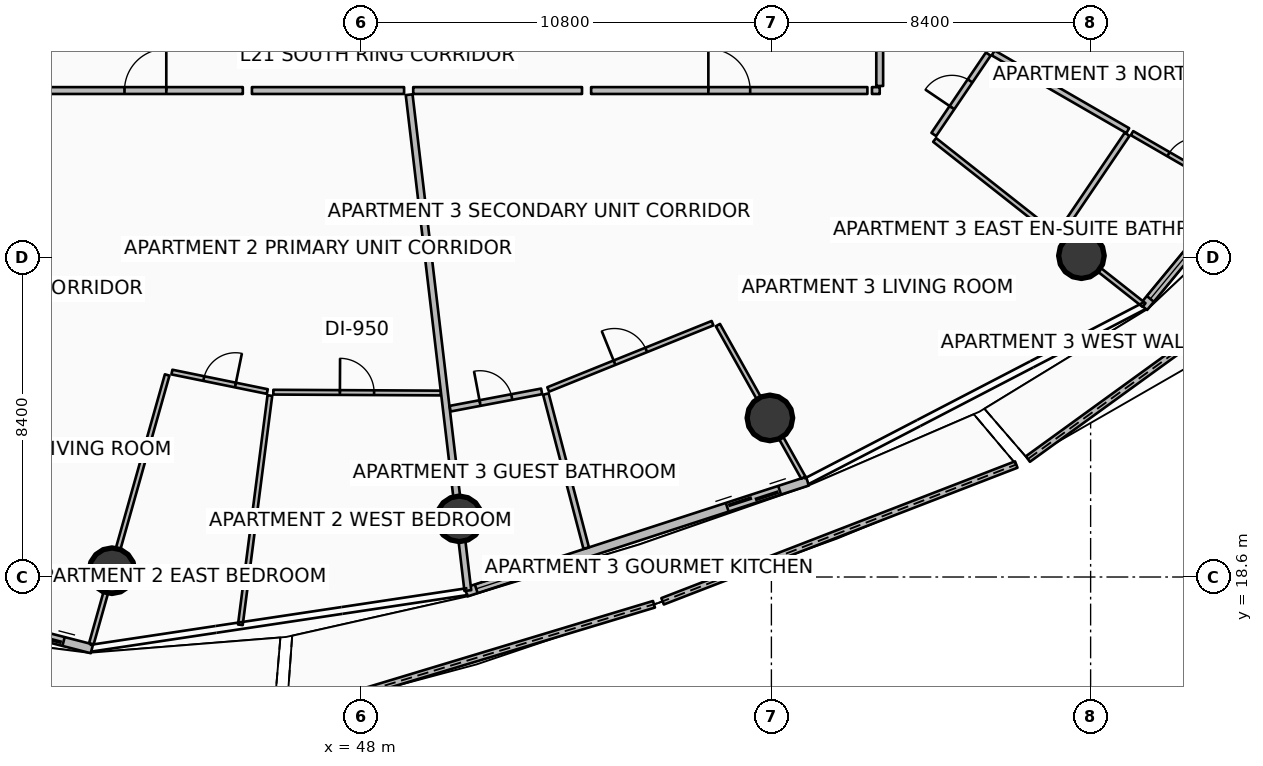
"""IFC4 building model, lengths in metres.
Left out: names, types, materials, properties, quantities, classifications, styles, units other than length and angle.
Written with IfcOpenShell. Run it as: python <this file> out.ifc"""

import sys

from ifc_helpers import new_model, si_unit, direction, frame, frame_2d, origin, origin_2d, place, context, subcontext, project, spatial, polyline, rectangle, circle, outline, extrude, element, fill, save


model = new_model("IFC4")
c1 = context("Model", 3, precision=1e-05, world=origin(), true_north=direction((0.0, 1.0)))
c2 = subcontext(c1, "Body", "Model", "MODEL_VIEW")
j1 = project(units=[si_unit("LENGTHUNIT", "METRE"), si_unit("PLANEANGLEUNIT", "RADIAN")], contexts=[c1])
p1 = place(None, origin())
s1 = spatial("IfcSite", under=j1, at=p1, CompositionType="ELEMENT")
p2 = place(p1, origin())
s2 = spatial("IfcBuilding", under=s1, at=p2, CompositionType="ELEMENT")
p3 = place(p2, frame((0.0, 0.0, 86.4)))
s3 = spatial("IfcBuildingStorey", under=s2, at=p3, CompositionType="ELEMENT", Elevation=86.4)
for number, where, z_axis, x_axis in (
    (1, (41.447, 18.766, 0.0), (0.0, 0.0, 1.0), (1.0, 0.0, 0.0)),
    (2, (50.588, 20.131, 0.0), (0.0, 0.0, 1.0), (1.0, 0.0, 0.0)),
    (3, (58.76, 22.786, 0.0), (0.0, 0.0, 1.0), (1.0, 0.0, 0.0)),
    (4, (66.958, 27.055, 0.0), (0.0, 0.0, 1.0), (1.0, 0.0, 0.0)),
):
    element("IfcColumn", number, at=place(p3, frame(where, z_axis=z_axis, x_axis=x_axis)), inside=s3, PredefinedType="COLUMN", context=c2, shape_type="SweptSolid", body=[
        extrude(circle(Radius=0.6, at=origin_2d()), origin(), (0.0, 0.0, 1.0), 3.5),
    ])
p4 = place(p3, frame((46.038, 14.964, 0.0), z_axis=(0.0, 0.0, 1.0), x_axis=(0.957356090971, 0.288910565886, 0.0)))
e5 = element("IfcWall", 5, at=p4, inside=s3, PredefinedType="PARAPET", context=c2, shape_type="SweptSolid", body=[
    extrude(outline(polyline([(0.0, 0.0), (10.103, 0.0), (10.103, 1.148), (5.051, 1.284), (0.0, 1.483), (0.0, 0.0)])), frame((0.0, 0.09, 0.0), z_axis=(0.0, -1.0, 0.0), x_axis=(1.0, 0.0, 0.0)), (0.0, 0.0, 1.0), 0.18),
])
p5 = place(p3, frame((55.937, 17.961, 0.0), z_axis=(0.0, 0.0, 1.0), x_axis=(0.93269770772, 0.360659099446, 0.0)))
e6 = element("IfcWall", 6, at=p5, inside=s3, PredefinedType="PARAPET", context=c2, shape_type="SweptSolid", body=[
    extrude(outline(polyline([(0.0, 0.0), (9.978, 0.0), (9.978, 1.224), (4.989, 1.127), (0.0, 1.148), (0.0, 0.0)])), frame((0.0, 0.09, 0.0), z_axis=(0.0, -1.0, 0.0), x_axis=(1.0, 0.0, 0.0)), (0.0, 0.0, 1.0), 0.18),
])
p6 = place(p3, frame((65.55, 21.704, 0.0), z_axis=(0.0, 0.0, 1.0), x_axis=(0.809764200103, 0.58675543477, 0.0)))
e7 = element("IfcWall", 7, at=p6, inside=s3, PredefinedType="PARAPET", context=c2, shape_type="SweptSolid", body=[
    extrude(outline(polyline([(0.0, 0.0), (11.241, 0.0), (11.241, 1.632), (5.621, 1.418), (0.0, 1.233), (0.0, 0.0)])), frame((0.0, 0.09, 0.0), z_axis=(0.0, -1.0, 0.0), x_axis=(1.0, 0.0, 0.0)), (0.0, 0.0, 1.0), 0.18),
])
p7 = place(p3, frame((30.186, 19.477, 0.0), z_axis=(0.0, 0.0, 1.0), x_axis=(0.968356180858, -0.249572248045, 0.0)))
e8 = element("IfcWall", 8, at=p7, inside=s3, PredefinedType="SOLIDWALL", context=c2, shape_type="SweptSolid", body=[
    extrude(rectangle(XDim=11.084, YDim=0.24, at=frame_2d((5.542, 0.0))), origin(), (0.0, 0.0, 1.0), 2.45),
])
p8 = place(p7, frame((8.865, 0.0, 0.0)))
e9 = element("IfcOpeningElement", 9, at=p8, cuts=e8, PredefinedType="OPENING", context=c2, shape_type="SweptSolid", body=[
    extrude(rectangle(XDim=1.45, YDim=2.15, at=frame_2d((0.725, 1.075))), frame((0.0, 0.13, 0.0), z_axis=(0.0, -1.0, 0.0), x_axis=(1.0, 0.0, 0.0)), (0.0, 0.0, 1.0), 0.26),
])
p9 = place(p7, frame((0.28, 0.0, 0.65)))
e10 = element("IfcOpeningElement", 10, at=p9, cuts=e8, PredefinedType="OPENING", context=c2, shape_type="SweptSolid", body=[
    extrude(rectangle(XDim=1.6, YDim=1.5, at=frame_2d((0.8, 0.75))), frame((0.0, 0.13, 0.0), z_axis=(0.0, -1.0, 0.0), x_axis=(1.0, 0.0, 0.0)), (0.0, 0.0, 1.0), 0.26),
])
p10 = place(p3, frame((50.767, 18.203, 0.0), z_axis=(0.0, 0.0, 1.0), x_axis=(0.951052494852, 0.30902937083, 0.0)))
e11 = element("IfcWall", 11, at=p10, inside=s3, PredefinedType="SOLIDWALL", context=c2, shape_type="SweptSolid", body=[
    extrude(rectangle(XDim=9.444, YDim=0.24, at=frame_2d((4.722, 0.0))), origin(), (0.0, 0.0, 1.0), 2.45),
])
p11 = place(p10, frame((7.224, 0.0, 0.0)))
e12 = element("IfcOpeningElement", 12, at=p11, cuts=e11, PredefinedType="OPENING", context=c2, shape_type="SweptSolid", body=[
    extrude(rectangle(XDim=1.45, YDim=2.15, at=frame_2d((0.725, 1.075))), frame((0.0, 0.13, 0.0), z_axis=(0.0, -1.0, 0.0), x_axis=(1.0, 0.0, 0.0)), (0.0, 0.0, 1.0), 0.26),
])
p12 = place(p10, frame((0.28, 0.0, 0.65)))
e13 = element("IfcOpeningElement", 13, at=p12, cuts=e11, PredefinedType="OPENING", context=c2, shape_type="SweptSolid", body=[
    extrude(rectangle(XDim=1.6, YDim=1.5, at=frame_2d((0.8, 0.75))), frame((0.0, 0.13, 0.0), z_axis=(0.0, -1.0, 0.0), x_axis=(1.0, 0.0, 0.0)), (0.0, 0.0, 1.0), 0.26),
])
p13 = place(p3, frame((68.593, 25.702, 0.0), z_axis=(0.0, 0.0, 1.0), x_axis=(0.636704975, 0.771107498868, 0.0)))
e14 = element("IfcWall", 14, at=p13, inside=s3, PredefinedType="SOLIDWALL", context=c2, shape_type="SweptSolid", body=[
    extrude(rectangle(XDim=11.084, YDim=0.24, at=frame_2d((5.542, 0.0))), origin(), (0.0, 0.0, 1.0), 2.45),
])
p14 = place(p13, frame((8.864, 0.0, 0.0)))
e15 = element("IfcOpeningElement", 15, at=p14, cuts=e14, PredefinedType="OPENING", context=c2, shape_type="SweptSolid", body=[
    extrude(rectangle(XDim=1.45, YDim=2.15, at=frame_2d((0.725, 1.075))), frame((0.0, 0.13, 0.0), z_axis=(0.0, -1.0, 0.0), x_axis=(1.0, 0.0, 0.0)), (0.0, 0.0, 1.0), 0.26),
])
p15 = place(p13, frame((0.28, 0.0, 0.65)))
e16 = element("IfcOpeningElement", 16, at=p15, cuts=e14, PredefinedType="OPENING", context=c2, shape_type="SweptSolid", body=[
    extrude(rectangle(XDim=1.6, YDim=1.5, at=frame_2d((0.8, 0.75))), frame((0.0, 0.13, 0.0), z_axis=(0.0, -1.0, 0.0), x_axis=(1.0, 0.0, 0.0)), (0.0, 0.0, 1.0), 0.26),
])
p16 = place(p3, frame((49.268, 31.291, 0.0), z_axis=(0.0, 0.0, 1.0), x_axis=(0.117532311618, -0.993069058891, 0.0)))
e17 = element("IfcWall", 17, at=p16, inside=s3, PredefinedType="PARTITIONING", context=c2, shape_type="SweptSolid", body=[
    extrude(rectangle(XDim=13.138, YDim=0.18, at=frame_2d((6.569, 0.0))), origin(), (0.0, 0.0, 1.0), 2.94),
])
p17 = place(p3, frame((39.764, 31.4, 0.0), z_axis=(0.0, 0.0, 1.0), x_axis=(1.0, 0.0, 0.0)))
e18 = element("IfcWall", 18, at=p17, inside=s3, PredefinedType="PARTITIONING", context=c2, shape_type="SweptSolid", body=[
    extrude(rectangle(XDim=5.127, YDim=0.18, at=frame_2d((2.563, 0.0))), origin(), (0.0, 0.0, 1.0), 2.94),
])
p18 = place(p17, frame((2.013, 0.0, 0.0)))
e19 = element("IfcOpeningElement", 19, at=p18, cuts=e18, PredefinedType="OPENING", context=c2, shape_type="SweptSolid", body=[
    extrude(rectangle(XDim=1.1, YDim=2.1, at=frame_2d((0.55, 1.05))), frame((0.0, 0.1, 0.0), z_axis=(0.0, -1.0, 0.0), x_axis=(1.0, 0.0, 0.0)), (0.0, 0.0, 1.0), 0.2),
])
p19 = place(p3, frame((45.131, 31.4, 0.0), z_axis=(0.0, 0.0, 1.0), x_axis=(1.0, 0.0, 0.0)))
e20 = element("IfcWall", 20, at=p19, inside=s3, PredefinedType="PARTITIONING", context=c2, shape_type="SweptSolid", body=[
    extrude(rectangle(XDim=4.004, YDim=0.18, at=frame_2d((2.002, 0.0))), origin(), (0.0, 0.0, 1.0), 2.94),
])
p20 = place(p3, frame((42.9, 23.917, 0.0), z_axis=(0.0, 0.0, 1.0), x_axis=(-0.27145069635, -0.962452346587, 0.0)))
e21 = element("IfcWall", 21, at=p20, inside=s3, PredefinedType="PARTITIONING", context=c2, shape_type="SweptSolid", body=[
    extrude(rectangle(XDim=7.349, YDim=0.125, at=frame_2d((3.674, 0.0))), origin(), (0.0, 0.0, 1.0), 2.94),
])
p21 = place(p3, frame((45.603, 23.375, 0.0), z_axis=(0.0, 0.0, 1.0), x_axis=(-0.127689849516, -0.991814147071, 0.0)))
e22 = element("IfcWall", 22, at=p21, inside=s3, PredefinedType="PARTITIONING", context=c2, shape_type="SweptSolid", body=[
    extrude(rectangle(XDim=6.082, YDim=0.125, at=frame_2d((3.041, 0.0))), origin(), (0.0, 0.0, 1.0), 2.94),
])
p22 = place(p3, frame((43.025, 23.993, 0.0), z_axis=(0.0, 0.0, 1.0), x_axis=(0.97978119615, -0.200072006215, 0.0)))
e23 = element("IfcWall", 23, at=p22, inside=s3, PredefinedType="PARTITIONING", context=c2, shape_type="SweptSolid", body=[
    extrude(rectangle(XDim=2.562, YDim=0.125, at=frame_2d((1.281, 0.0))), origin(), (0.0, 0.0, 1.0), 2.94),
])
p23 = place(p22, frame((0.856, 0.0, 0.0)))
e24 = element("IfcOpeningElement", 24, at=p23, cuts=e23, PredefinedType="OPENING", context=c2, shape_type="SweptSolid", body=[
    extrude(rectangle(XDim=0.85, YDim=2.06, at=frame_2d((0.425, 1.03))), frame((0.0, 0.073, 0.0), z_axis=(0.0, -1.0, 0.0), x_axis=(1.0, 0.0, 0.0)), (0.0, 0.0, 1.0), 0.145),
])
p24 = place(p3, frame((45.694, 23.463, 0.0), z_axis=(0.0, 0.0, 1.0), x_axis=(0.999986986287, -0.005101691496, 0.0)))
e25 = element("IfcWall", 25, at=p24, inside=s3, PredefinedType="PARTITIONING", context=c2, shape_type="SweptSolid", body=[
    extrude(rectangle(XDim=4.403, YDim=0.125, at=frame_2d((2.201, 0.0))), origin(), (0.0, 0.0, 1.0), 2.94),
])
p25 = place(p24, frame((1.751, 0.0, 0.0)))
e26 = element("IfcOpeningElement", 26, at=p25, cuts=e25, PredefinedType="OPENING", context=c2, shape_type="SweptSolid", body=[
    extrude(rectangle(XDim=0.9, YDim=2.08, at=frame_2d((0.45, 1.04))), frame((0.0, 0.073, 0.0), z_axis=(0.0, -1.0, 0.0), x_axis=(1.0, 0.0, 0.0)), (0.0, 0.0, 1.0), 0.145),
])
p26 = place(p3, frame((54.056, 31.4, 0.0), z_axis=(0.0, 0.0, 1.0), x_axis=(1.0, 0.0, 0.0)))
e27 = element("IfcWall", 27, at=p26, inside=s3, PredefinedType="PARTITIONING", context=c2, shape_type="SweptSolid", body=[
    extrude(rectangle(XDim=7.27, YDim=0.18, at=frame_2d((3.635, 0.0))), origin(), (0.0, 0.0, 1.0), 2.94),
])
p27 = place(p26, frame((3.085, 0.0, 0.0)))
e28 = element("IfcOpeningElement", 28, at=p27, cuts=e27, PredefinedType="OPENING", context=c2, shape_type="SweptSolid", body=[
    extrude(rectangle(XDim=1.1, YDim=2.1, at=frame_2d((0.55, 1.05))), frame((0.0, 0.1, 0.0), z_axis=(0.0, -1.0, 0.0), x_axis=(1.0, 0.0, 0.0)), (0.0, 0.0, 1.0), 0.2),
])
p28 = place(p3, frame((49.375, 31.4, 0.0), z_axis=(0.0, 0.0, 1.0), x_axis=(1.0, 0.0, 0.0)))
e29 = element("IfcWall", 29, at=p28, inside=s3, PredefinedType="PARTITIONING", context=c2, shape_type="SweptSolid", body=[
    extrude(rectangle(XDim=4.442, YDim=0.18, at=frame_2d((2.221, 0.0))), origin(), (0.0, 0.0, 1.0), 2.94),
])
p29 = place(p3, frame((57.392, 25.229, 0.0), z_axis=(0.0, 0.0, 1.0), x_axis=(0.488604984913, -0.872505110998, 0.0)))
e30 = element("IfcWall", 30, at=p29, inside=s3, PredefinedType="PARTITIONING", context=c2, shape_type="SweptSolid", body=[
    extrude(rectangle(XDim=4.6, YDim=0.125, at=frame_2d((2.3, 0.0))), origin(), (0.0, 0.0, 1.0), 2.94),
])
p30 = place(p3, frame((50.346, 23.029, 0.0), z_axis=(0.0, 0.0, 1.0), x_axis=(0.982576637083, 0.185857881885, 0.0)))
e31 = element("IfcWall", 31, at=p30, inside=s3, PredefinedType="PARTITIONING", context=c2, shape_type="SweptSolid", body=[
    extrude(rectangle(XDim=2.451, YDim=0.15, at=frame_2d((1.226, 0.0))), origin(), (0.0, 0.0, 1.0), 2.94),
])
p31 = place(p30, frame((0.801, 0.0, 0.0)))
e32 = element("IfcOpeningElement", 32, at=p31, cuts=e31, PredefinedType="OPENING", context=c2, shape_type="SweptSolid", body=[
    extrude(rectangle(XDim=0.85, YDim=2.06, at=frame_2d((0.425, 1.03))), frame((0.0, 0.085, 0.0), z_axis=(0.0, -1.0, 0.0), x_axis=(1.0, 0.0, 0.0)), (0.0, 0.0, 1.0), 0.17),
])
p32 = place(p3, frame((52.865, 23.414, 0.0), z_axis=(0.0, 0.0, 1.0), x_axis=(0.253228265637, -0.96740655646, 0.0)))
e33 = element("IfcWall", 33, at=p32, inside=s3, PredefinedType="PARTITIONING", context=c2, shape_type="SweptSolid", body=[
    extrude(rectangle(XDim=4.19, YDim=0.15, at=frame_2d((2.095, 0.0))), origin(), (0.0, 0.0, 1.0), 2.94),
])
p33 = place(p3, frame((52.926, 23.535, 0.0), z_axis=(0.0, 0.0, 1.0), x_axis=(0.927447622914, 0.373953080949, 0.0)))
e34 = element("IfcWall", 34, at=p33, inside=s3, PredefinedType="PARTITIONING", context=c2, shape_type="SweptSolid", body=[
    extrude(rectangle(XDim=4.663, YDim=0.125, at=frame_2d((2.332, 0.0))), origin(), (0.0, 0.0, 1.0), 2.94),
])
p34 = place(p33, frame((1.881, 0.0, 0.0)))
e35 = element("IfcOpeningElement", 35, at=p34, cuts=e34, PredefinedType="OPENING", context=c2, shape_type="SweptSolid", body=[
    extrude(rectangle(XDim=0.9, YDim=2.08, at=frame_2d((0.45, 1.04))), frame((0.0, 0.073, 0.0), z_axis=(0.0, -1.0, 0.0), x_axis=(1.0, 0.0, 0.0)), (0.0, 0.0, 1.0), 0.145),
])
p35 = place(p3, frame((61.446, 31.4, 0.0), z_axis=(0.0, 0.0, 1.0), x_axis=(1.0, 0.0, 0.0)))
e36 = element("IfcWall", 36, at=p35, inside=s3, PredefinedType="PARTITIONING", context=c2, shape_type="SweptSolid", body=[
    extrude(rectangle(XDim=0.204, YDim=0.18, at=frame_2d((0.102, 0.0))), origin(), (0.0, 0.0, 1.0), 2.94),
])
p36 = place(p3, frame((61.65, 31.52, 0.0), z_axis=(0.0, 0.0, 1.0), x_axis=(0.0, 1.0, 0.0)))
e37 = element("IfcWall", 37, at=p36, inside=s3, PredefinedType="PARTITIONING", context=c2, shape_type="SweptSolid", body=[
    extrude(rectangle(XDim=6.51, YDim=0.18, at=frame_2d((3.255, 0.0))), origin(), (0.0, 0.0, 1.0), 2.94),
])
p37 = place(p3, frame((63.095, 30.1, 0.0), z_axis=(0.0, 0.0, 1.0), x_axis=(0.78530300145, -0.6191116183, 0.0)))
e38 = element("IfcWall", 38, at=p37, inside=s3, PredefinedType="PARTITIONING", context=c2, shape_type="SweptSolid", body=[
    extrude(rectangle(XDim=7.016, YDim=0.125, at=frame_2d((3.508, 0.0))), origin(), (0.0, 0.0, 1.0), 2.94),
])
p38 = place(p3, frame((63.073, 30.244, 0.0), z_axis=(0.0, 0.0, 1.0), x_axis=(0.561076223922, 0.827764139685, 0.0)))
e39 = element("IfcWall", 39, at=p38, inside=s3, PredefinedType="PARTITIONING", context=c2, shape_type="SweptSolid", body=[
    extrude(rectangle(XDim=2.556, YDim=0.15, at=frame_2d((1.278, 0.0))), origin(), (0.0, 0.0, 1.0), 2.94),
])
p39 = place(p38, frame((0.853, 0.0, 0.0)))
e40 = element("IfcOpeningElement", 40, at=p39, cuts=e39, PredefinedType="OPENING", context=c2, shape_type="SweptSolid", body=[
    extrude(rectangle(XDim=0.85, YDim=2.06, at=frame_2d((0.425, 1.03))), frame((0.0, 0.085, 0.0), z_axis=(0.0, -1.0, 0.0), x_axis=(1.0, 0.0, 0.0)), (0.0, 0.0, 1.0), 0.17),
])
p40 = place(p3, frame((66.387, 27.632, 0.0), z_axis=(0.0, 0.0, 1.0), x_axis=(0.561080301856, 0.82776137556, 0.0)))
e41 = element("IfcWall", 41, at=p40, inside=s3, PredefinedType="PARTITIONING", context=c2, shape_type="SweptSolid", body=[
    extrude(rectangle(XDim=3.162, YDim=0.15, at=frame_2d((1.581, 0.0))), origin(), (0.0, 0.0, 1.0), 2.94),
])
p41 = place(p3, frame((64.635, 32.39, 0.0), z_axis=(0.0, 0.0, 1.0), x_axis=(0.865897249189, -0.500221904605, 0.0)))
e42 = element("IfcWall", 42, at=p41, inside=s3, PredefinedType="PARTITIONING", context=c2, shape_type="SweptSolid", body=[
    extrude(rectangle(XDim=4.09, YDim=0.15, at=frame_2d((2.045, 0.0))), origin(), (0.0, 0.0, 1.0), 2.94),
])
p42 = place(p3, frame((68.29, 30.279, 0.0), z_axis=(0.0, 0.0, 1.0), x_axis=(0.865901850726, -0.50021393914, 0.0)))
e43 = element("IfcWall", 43, at=p42, inside=s3, PredefinedType="PARTITIONING", context=c2, shape_type="SweptSolid", body=[
    extrude(rectangle(XDim=3.067, YDim=0.125, at=frame_2d((1.534, 0.0))), origin(), (0.0, 0.0, 1.0), 2.94),
])
p43 = place(p42, frame((1.108, 0.0, 0.0)))
e44 = element("IfcOpeningElement", 44, at=p43, cuts=e43, PredefinedType="OPENING", context=c2, shape_type="SweptSolid", body=[
    extrude(rectangle(XDim=0.85, YDim=2.06, at=frame_2d((0.425, 1.03))), frame((0.0, 0.073, 0.0), z_axis=(0.0, -1.0, 0.0), x_axis=(1.0, 0.0, 0.0)), (0.0, 0.0, 1.0), 0.145),
])
p44 = place(p3, frame((65.764, 34.684, 0.0), z_axis=(0.0, 0.0, 1.0), x_axis=(0.924663817091, -0.380784486767, 0.0)))
e45 = element("IfcWall", 45, at=p44, inside=s3, PredefinedType="PARTITIONING", context=c2, shape_type="SweptSolid", body=[
    extrude(rectangle(XDim=8.143, YDim=0.125, at=frame_2d((4.072, 0.0))), origin(), (0.0, 0.0, 1.0), 2.94),
])
p45 = place(p8, origin())
e46 = element("IfcDoor", 46, at=p45, inside=s3, OperationType="DOUBLE_DOOR_SLIDING", PredefinedType="DOOR", context=c2, shape_type="SweptSolid", body=[
    extrude(rectangle(XDim=1.45, YDim=2.15, at=frame_2d((0.725, 1.075))), frame((0.0, 0.025, 0.0), z_axis=(0.0, -1.0, 0.0), x_axis=(1.0, 0.0, 0.0)), (0.0, 0.0, 1.0), 0.05),
])
fill(e9, e46)
p46 = place(p11, origin())
e47 = element("IfcDoor", 47, at=p46, inside=s3, OperationType="DOUBLE_DOOR_SLIDING", PredefinedType="DOOR", context=c2, shape_type="SweptSolid", body=[
    extrude(rectangle(XDim=1.45, YDim=2.15, at=frame_2d((0.725, 1.075))), frame((0.0, 0.025, 0.0), z_axis=(0.0, -1.0, 0.0), x_axis=(1.0, 0.0, 0.0)), (0.0, 0.0, 1.0), 0.05),
])
fill(e12, e47)
p47 = place(p12, origin())
e48 = element("IfcWindow", 48, at=p47, inside=s3, PartitioningType="SINGLE_PANEL", PredefinedType="WINDOW", context=c2, shape_type="SweptSolid", body=[
    extrude(rectangle(XDim=1.6, YDim=1.5, at=frame_2d((0.8, 0.75))), frame((0.0, 0.03, 0.0), z_axis=(0.0, -1.0, 0.0), x_axis=(1.0, 0.0, 0.0)), (0.0, 0.0, 1.0), 0.06),
])
fill(e13, e48)
p48 = place(p15, origin())
e49 = element("IfcWindow", 49, at=p48, inside=s3, PartitioningType="SINGLE_PANEL", PredefinedType="WINDOW", context=c2, shape_type="SweptSolid", body=[
    extrude(rectangle(XDim=1.6, YDim=1.5, at=frame_2d((0.8, 0.75))), frame((0.0, 0.03, 0.0), z_axis=(0.0, -1.0, 0.0), x_axis=(1.0, 0.0, 0.0)), (0.0, 0.0, 1.0), 0.06),
])
fill(e16, e49)
p49 = place(p18, origin())
e50 = element("IfcDoor", 50, at=p49, inside=s3, OperationType="SINGLE_SWING_RIGHT", PredefinedType="DOOR", context=c2, shape_type="SweptSolid", body=[
    extrude(rectangle(XDim=1.1, YDim=2.1, at=frame_2d((0.55, 1.05))), frame((0.0, 0.025, 0.0), z_axis=(0.0, -1.0, 0.0), x_axis=(1.0, 0.0, 0.0)), (0.0, 0.0, 1.0), 0.05),
])
fill(e19, e50)
p50 = place(p23, origin())
e51 = element("IfcDoor", 51, at=p50, inside=s3, OperationType="SINGLE_SWING_RIGHT", PredefinedType="DOOR", context=c2, shape_type="SweptSolid", body=[
    extrude(rectangle(XDim=0.85, YDim=2.06, at=frame_2d((0.425, 1.03))), frame((0.0, 0.025, 0.0), z_axis=(0.0, -1.0, 0.0), x_axis=(1.0, 0.0, 0.0)), (0.0, 0.0, 1.0), 0.05),
])
fill(e24, e51)
p51 = place(p25, origin())
e52 = element("IfcDoor", 52, at=p51, inside=s3, OperationType="SINGLE_SWING_LEFT", PredefinedType="DOOR", context=c2, shape_type="SweptSolid", body=[
    extrude(rectangle(XDim=0.9, YDim=2.08, at=frame_2d((0.45, 1.04))), frame((0.0, 0.025, 0.0), z_axis=(0.0, -1.0, 0.0), x_axis=(1.0, 0.0, 0.0)), (0.0, 0.0, 1.0), 0.05),
])
fill(e26, e52)
p52 = place(p27, origin())
e53 = element("IfcDoor", 53, at=p52, inside=s3, OperationType="SINGLE_SWING_LEFT", PredefinedType="DOOR", context=c2, shape_type="SweptSolid", body=[
    extrude(rectangle(XDim=1.1, YDim=2.1, at=frame_2d((0.55, 1.05))), frame((0.0, 0.025, 0.0), z_axis=(0.0, -1.0, 0.0), x_axis=(1.0, 0.0, 0.0)), (0.0, 0.0, 1.0), 0.05),
])
fill(e28, e53)
p53 = place(p31, origin())
e54 = element("IfcDoor", 54, at=p53, inside=s3, OperationType="SINGLE_SWING_LEFT", PredefinedType="DOOR", context=c2, shape_type="SweptSolid", body=[
    extrude(rectangle(XDim=0.85, YDim=2.06, at=frame_2d((0.425, 1.03))), frame((0.0, 0.025, 0.0), z_axis=(0.0, -1.0, 0.0), x_axis=(1.0, 0.0, 0.0)), (0.0, 0.0, 1.0), 0.05),
])
fill(e32, e54)
p54 = place(p34, origin())
e55 = element("IfcDoor", 55, at=p54, inside=s3, OperationType="SINGLE_SWING_LEFT", PredefinedType="DOOR", context=c2, shape_type="SweptSolid", body=[
    extrude(rectangle(XDim=0.9, YDim=2.08, at=frame_2d((0.45, 1.04))), frame((0.0, 0.025, 0.0), z_axis=(0.0, -1.0, 0.0), x_axis=(1.0, 0.0, 0.0)), (0.0, 0.0, 1.0), 0.05),
])
fill(e35, e55)
p55 = place(p39, origin())
e56 = element("IfcDoor", 56, at=p55, inside=s3, OperationType="SINGLE_SWING_LEFT", PredefinedType="DOOR", context=c2, shape_type="SweptSolid", body=[
    extrude(rectangle(XDim=0.85, YDim=2.06, at=frame_2d((0.425, 1.03))), frame((0.0, 0.025, 0.0), z_axis=(0.0, -1.0, 0.0), x_axis=(1.0, 0.0, 0.0)), (0.0, 0.0, 1.0), 0.05),
])
fill(e40, e56)
p56 = place(p43, origin())
e57 = element("IfcDoor", 57, at=p56, inside=s3, OperationType="SINGLE_SWING_RIGHT", PredefinedType="DOOR", context=c2, shape_type="SweptSolid", body=[
    extrude(rectangle(XDim=0.85, YDim=2.06, at=frame_2d((0.425, 1.03))), frame((0.0, 0.025, 0.0), z_axis=(0.0, -1.0, 0.0), x_axis=(1.0, 0.0, 0.0)), (0.0, 0.0, 1.0), 0.05),
])
fill(e44, e57)
save(model, sys.argv[1])
